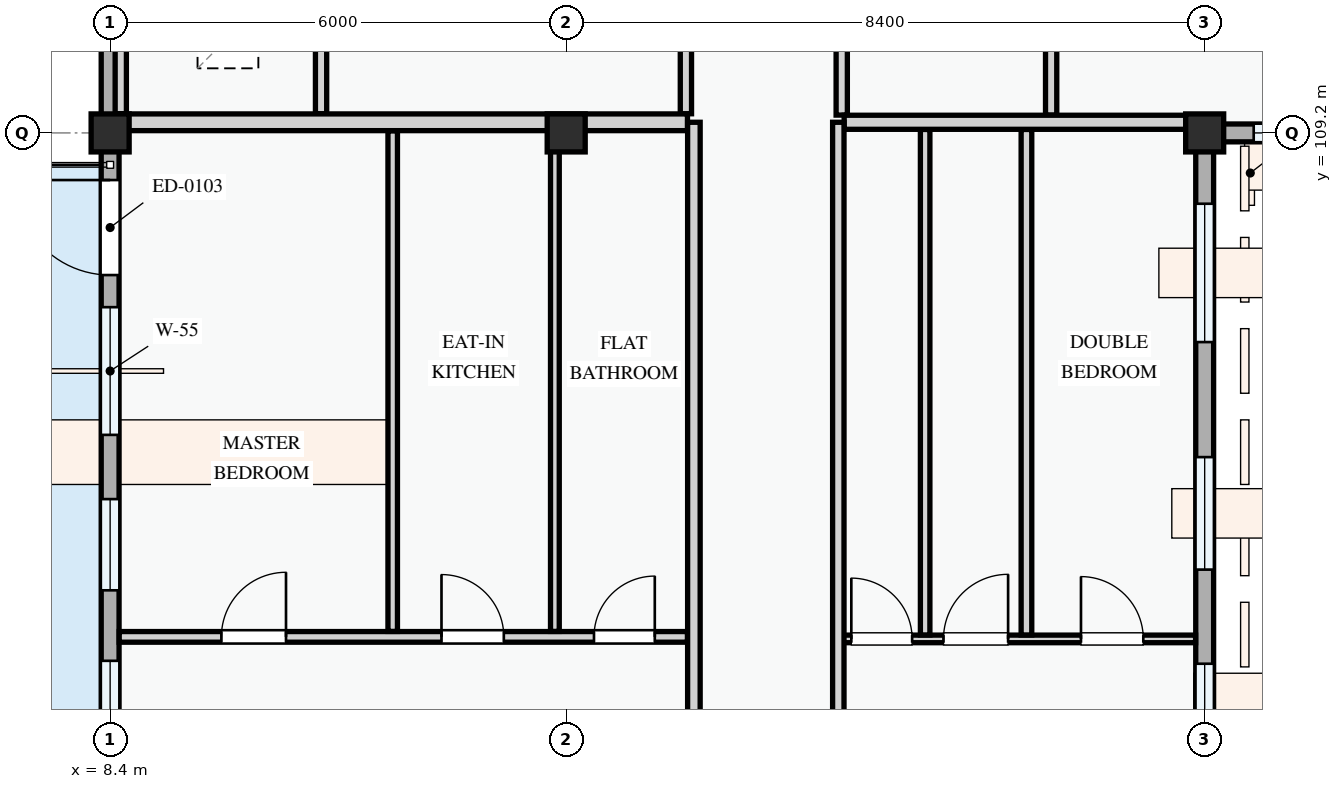
"""IFC4 building model, lengths in metres.
Left out: names, types, materials, properties, quantities, classifications, styles, units other than length and angle.
Written with IfcOpenShell. Run it as: python <this file> out.ifc"""

import sys

from ifc_helpers import new_model, si_unit, direction, frame, frame_2d, origin, origin_2d, place, context, subcontext, project, spatial, rectangle, extrude, element, fill, save


model = new_model("IFC4")
c1 = context("Model", 3, precision=1e-05, world=origin(), true_north=direction((0.0, 1.0)))
c2 = subcontext(c1, "Body", "Model", "MODEL_VIEW")
j1 = project(units=[si_unit("LENGTHUNIT", "METRE"), si_unit("PLANEANGLEUNIT", "RADIAN")], contexts=[c1])
p1 = place(None, origin())
s1 = spatial("IfcSite", under=j1, at=p1, CompositionType="ELEMENT")
p2 = place(p1, origin())
s2 = spatial("IfcBuilding", under=s1, at=p2, CompositionType="ELEMENT")
p3 = place(p2, frame((0.0, 0.0, 44.4)))
s3 = spatial("IfcBuildingStorey", under=s2, at=p3, CompositionType="ELEMENT", Elevation=44.4)
for number, where, z_axis, x_axis in (
    (1, (8.4, 109.2, 0.0), (0.0, 0.0, 1.0), (1.0, 0.0, 0.0)),
    (2, (14.4, 109.2, 0.0), (0.0, 0.0, 1.0), (1.0, 0.0, 0.0)),
    (3, (22.8, 109.2, 0.0), (0.0, 0.0, 1.0), (1.0, 0.0, 0.0)),
):
    element("IfcColumn", number, at=place(p3, frame(where, z_axis=z_axis, x_axis=x_axis)), inside=s3, PredefinedType="COLUMN", context=c2, shape_type="SweptSolid", body=[
        extrude(rectangle(XDim=0.5, YDim=0.5, at=origin_2d()), origin(), (0.0, 0.0, 1.0), 3.3),
    ])
p4 = place(p3, frame((22.8, 109.2, 0.0), z_axis=(0.0, 0.0, 1.0), x_axis=(1.0, 0.0, 0.0)))
e4 = element("IfcWall", 4, at=p4, inside=s3, PredefinedType="STANDARD", context=c2, shape_type="SweptSolid", body=[
    extrude(rectangle(XDim=6.0, YDim=0.235, at=frame_2d((3.0, 0.0))), origin(), (0.0, 0.0, 1.0), 2.525),
])
p5 = place(p4, frame((0.645, 0.0, 0.78)))
e5 = element("IfcOpeningElement", 5, at=p5, cuts=e4, PredefinedType="OPENING", context=c2, shape_type="SweptSolid", body=[
    extrude(rectangle(XDim=1.25, YDim=1.45, at=frame_2d((0.625, 0.725))), frame((0.0, 0.127, 0.0), z_axis=(0.0, -1.0, 0.0), x_axis=(1.0, 0.0, 0.0)), (0.0, 0.0, 1.0), 0.255),
])
p6 = place(p4, frame((3.17, 0.0, 0.78)))
e6 = element("IfcOpeningElement", 6, at=p6, cuts=e4, PredefinedType="OPENING", context=c2, shape_type="SweptSolid", body=[
    extrude(rectangle(XDim=1.82, YDim=1.46, at=frame_2d((0.91, 0.73))), frame((0.0, 0.127, 0.0), z_axis=(0.0, -1.0, 0.0), x_axis=(1.0, 0.0, 0.0)), (0.0, 0.0, 1.0), 0.255),
])
p7 = place(p3, frame((8.4, 115.2, 0.0), z_axis=(0.0, 0.0, 1.0), x_axis=(0.0, -1.0, 0.0)))
e7 = element("IfcWall", 7, at=p7, inside=s3, PredefinedType="STANDARD", context=c2, shape_type="SweptSolid", body=[
    extrude(rectangle(XDim=6.0, YDim=0.235, at=frame_2d((3.0, 0.0))), origin(), (0.0, 0.0, 1.0), 2.575),
])
p8 = place(p7, frame((0.545, 0.0, 0.78)))
e8 = element("IfcOpeningElement", 8, at=p8, cuts=e7, PredefinedType="OPENING", context=c2, shape_type="SweptSolid", body=[
    extrude(rectangle(XDim=0.9, YDim=1.2, at=frame_2d((0.45, 0.6))), frame((0.0, 0.127, 0.0), z_axis=(0.0, -1.0, 0.0), x_axis=(1.0, 0.0, 0.0)), (0.0, 0.0, 1.0), 0.255),
])
p9 = place(p7, frame((3.33, 0.0, 0.78)))
e9 = element("IfcOpeningElement", 9, at=p9, cuts=e7, PredefinedType="OPENING", context=c2, shape_type="SweptSolid", body=[
    extrude(rectangle(XDim=0.95, YDim=1.15, at=frame_2d((0.475, 0.575))), frame((0.0, 0.127, 0.0), z_axis=(0.0, -1.0, 0.0), x_axis=(1.0, 0.0, 0.0)), (0.0, 0.0, 1.0), 0.255),
])
p10 = place(p3, frame((8.4, 109.2, 0.0), z_axis=(0.0, 0.0, 1.0), x_axis=(0.0, -1.0, 0.0)))
e10 = element("IfcWall", 10, at=p10, inside=s3, PredefinedType="STANDARD", context=c2, shape_type="SweptSolid", body=[
    extrude(rectangle(XDim=8.4, YDim=0.235, at=frame_2d((4.2, 0.0))), origin(), (0.0, 0.0, 1.0), 2.425),
])
p11 = place(p10, frame((0.62, 0.0, 0.0)))
e11 = element("IfcOpeningElement", 11, at=p11, cuts=e10, PredefinedType="OPENING", context=c2, shape_type="SweptSolid", body=[
    extrude(rectangle(XDim=1.25, YDim=2.2, at=frame_2d((0.625, 1.1))), frame((0.0, 0.127, 0.0), z_axis=(0.0, -1.0, 0.0), x_axis=(1.0, 0.0, 0.0)), (0.0, 0.0, 1.0), 0.255),
])
p12 = place(p10, frame((2.292, 0.0, 0.78)))
e12 = element("IfcOpeningElement", 12, at=p12, cuts=e10, PredefinedType="OPENING", context=c2, shape_type="SweptSolid", body=[
    extrude(rectangle(XDim=1.68, YDim=1.46, at=frame_2d((0.84, 0.73))), frame((0.0, 0.127, 0.0), z_axis=(0.0, -1.0, 0.0), x_axis=(1.0, 0.0, 0.0)), (0.0, 0.0, 1.0), 0.255),
])
p13 = place(p10, frame((4.817, 0.0, 0.78)))
e13 = element("IfcOpeningElement", 13, at=p13, cuts=e10, PredefinedType="OPENING", context=c2, shape_type="SweptSolid", body=[
    extrude(rectangle(XDim=1.2, YDim=1.35, at=frame_2d((0.6, 0.675))), frame((0.0, 0.127, 0.0), z_axis=(0.0, -1.0, 0.0), x_axis=(1.0, 0.0, 0.0)), (0.0, 0.0, 1.0), 0.255),
])
p14 = place(p10, frame((6.945, 0.0, 0.78)))
e14 = element("IfcOpeningElement", 14, at=p14, cuts=e10, PredefinedType="OPENING", context=c2, shape_type="SweptSolid", body=[
    extrude(rectangle(XDim=0.95, YDim=1.15, at=frame_2d((0.475, 0.575))), frame((0.0, 0.127, 0.0), z_axis=(0.0, -1.0, 0.0), x_axis=(1.0, 0.0, 0.0)), (0.0, 0.0, 1.0), 0.255),
])
p15 = place(p3, frame((22.8, 100.8, 0.0), z_axis=(0.0, 0.0, 1.0), x_axis=(0.0, 1.0, 0.0)))
e15 = element("IfcWall", 15, at=p15, inside=s3, PredefinedType="STANDARD", context=c2, shape_type="SweptSolid", body=[
    extrude(rectangle(XDim=8.4, YDim=0.235, at=frame_2d((4.2, 0.0))), origin(), (0.0, 0.0, 1.0), 2.425),
])
p16 = place(p15, frame((0.517, 0.0, 0.78)))
e16 = element("IfcOpeningElement", 16, at=p16, cuts=e15, PredefinedType="OPENING", context=c2, shape_type="SweptSolid", body=[
    extrude(rectangle(XDim=0.9, YDim=1.2, at=frame_2d((0.45, 0.6))), frame((0.0, 0.127, 0.0), z_axis=(0.0, -1.0, 0.0), x_axis=(1.0, 0.0, 0.0)), (0.0, 0.0, 1.0), 0.255),
])
p17 = place(p15, frame((2.655, 0.0, 0.78)))
e17 = element("IfcOpeningElement", 17, at=p17, cuts=e15, PredefinedType="OPENING", context=c2, shape_type="SweptSolid", body=[
    extrude(rectangle(XDim=1.48, YDim=1.52, at=frame_2d((0.74, 0.76))), frame((0.0, 0.127, 0.0), z_axis=(0.0, -1.0, 0.0), x_axis=(1.0, 0.0, 0.0)), (0.0, 0.0, 1.0), 0.255),
])
p18 = place(p15, frame((5.648, 0.0, 0.78)))
e18 = element("IfcOpeningElement", 18, at=p18, cuts=e15, PredefinedType="OPENING", context=c2, shape_type="SweptSolid", body=[
    extrude(rectangle(XDim=1.82, YDim=1.46, at=frame_2d((0.91, 0.73))), frame((0.0, 0.127, 0.0), z_axis=(0.0, -1.0, 0.0), x_axis=(1.0, 0.0, 0.0)), (0.0, 0.0, 1.0), 0.255),
])
p19 = place(p3, frame((8.54, 113.324, 0.0), z_axis=(0.0, 0.0, 1.0), x_axis=(0.0, -1.0, 0.0)))
e19 = element("IfcWall", 19, at=p19, inside=s3, PredefinedType="PARTITIONING", context=c2, shape_type="SweptSolid", body=[
    extrude(rectangle(XDim=3.872, YDim=0.148, at=frame_2d((1.936, 0.0))), origin(), (0.0, 0.0, 1.0), 2.575),
])
for number, where, z_axis, x_axis in (
    (20, (11.175, 113.324, 0.0), (0.0, 0.0, 1.0), (0.0, -1.0, 0.0)),
    (21, (15.975, 113.324, 0.0), (0.0, 0.0, 1.0), (0.0, -1.0, 0.0)),
):
    element("IfcWall", number, at=place(p3, frame(where, z_axis=z_axis, x_axis=x_axis)), inside=s3, PredefinedType="PARTITIONING", context=c2, shape_type="SweptSolid", body=[
        extrude(rectangle(XDim=3.872, YDim=0.148, at=frame_2d((1.936, 0.0))), origin(), (0.0, 0.0, 1.0), 3.0),
    ])
for number, where, z_axis, x_axis in (
    (22, (18.025, 113.324, 0.0), (0.0, 0.0, 1.0), (0.0, -1.0, 0.0)),
    (23, (20.78, 113.324, 0.0), (0.0, 0.0, 1.0), (0.0, -1.0, 0.0)),
):
    element("IfcWall", number, at=place(p3, frame(where, z_axis=z_axis, x_axis=x_axis)), inside=s3, PredefinedType="PARTITIONING", context=c2, shape_type="SweptSolid", body=[
        extrude(rectangle(XDim=3.889, YDim=0.148, at=frame_2d((1.945, 0.0))), origin(), (0.0, 0.0, 1.0), 3.0),
    ])
p20 = place(p3, frame((8.52, 102.57, 0.0), z_axis=(0.0, 0.0, 1.0), x_axis=(1.0, 0.0, 0.0)))
e24 = element("IfcWall", 24, at=p20, inside=s3, PredefinedType="PARTITIONING", context=c2, shape_type="SweptSolid", body=[
    extrude(rectangle(XDim=7.476, YDim=0.14, at=frame_2d((3.738, 0.0))), origin(), (0.0, 0.0, 1.0), 3.0),
])
p21 = place(p20, frame((1.344, 0.0, 0.0)))
e25 = element("IfcOpeningElement", 25, at=p21, cuts=e24, PredefinedType="OPENING", context=c2, shape_type="SweptSolid", body=[
    extrude(rectangle(XDim=0.85, YDim=2.1, at=frame_2d((0.425, 1.05))), frame((0.0, 0.08, 0.0), z_axis=(0.0, -1.0, 0.0), x_axis=(1.0, 0.0, 0.0)), (0.0, 0.0, 1.0), 0.16),
])
p22 = place(p20, frame((4.24, 0.0, 0.0)))
e26 = element("IfcOpeningElement", 26, at=p22, cuts=e24, PredefinedType="OPENING", context=c2, shape_type="SweptSolid", body=[
    extrude(rectangle(XDim=0.82, YDim=2.08, at=frame_2d((0.41, 1.04))), frame((0.0, 0.08, 0.0), z_axis=(0.0, -1.0, 0.0), x_axis=(1.0, 0.0, 0.0)), (0.0, 0.0, 1.0), 0.16),
])
p23 = place(p20, frame((6.246, 0.0, 0.0)))
e27 = element("IfcOpeningElement", 27, at=p23, cuts=e24, PredefinedType="OPENING", context=c2, shape_type="SweptSolid", body=[
    extrude(rectangle(XDim=0.8, YDim=2.1, at=frame_2d((0.4, 1.05))), frame((0.0, 0.08, 0.0), z_axis=(0.0, -1.0, 0.0), x_axis=(1.0, 0.0, 0.0)), (0.0, 0.0, 1.0), 0.16),
])
p24 = place(p3, frame((12.118, 102.642, 0.0), z_axis=(0.0, 0.0, 1.0), x_axis=(0.0, 1.0, 0.0)))
e28 = element("IfcWall", 28, at=p24, inside=s3, PredefinedType="PARTITIONING", context=c2, shape_type="SweptSolid", body=[
    extrude(rectangle(XDim=6.586, YDim=0.125, at=frame_2d((3.293, 0.0))), origin(), (0.0, 0.0, 1.0), 3.0),
])
p25 = place(p3, frame((14.251, 102.642, 0.0), z_axis=(0.0, 0.0, 1.0), x_axis=(0.0, 1.0, 0.0)))
e29 = element("IfcWall", 29, at=p25, inside=s3, PredefinedType="PARTITIONING", context=c2, shape_type="SweptSolid", body=[
    extrude(rectangle(XDim=6.586, YDim=0.115, at=frame_2d((3.293, 0.0))), origin(), (0.0, 0.0, 1.0), 2.425),
])
p26 = place(p3, frame((17.98, 102.543, 0.0), z_axis=(0.0, 0.0, 1.0), x_axis=(1.0, 0.0, 0.0)))
e30 = element("IfcWall", 30, at=p26, inside=s3, PredefinedType="PARTITIONING", context=c2, shape_type="SweptSolid", body=[
    extrude(rectangle(XDim=4.7, YDim=0.1, at=frame_2d((2.35, 0.0))), origin(), (0.0, 0.0, 1.0), 3.0),
])
p27 = place(p26, frame((0.171, 0.0, 0.0)))
e31 = element("IfcOpeningElement", 31, at=p27, cuts=e30, PredefinedType="OPENING", context=c2, shape_type="SweptSolid", body=[
    extrude(rectangle(XDim=0.8, YDim=2.1, at=frame_2d((0.4, 1.05))), frame((0.0, 0.06, 0.0), z_axis=(0.0, -1.0, 0.0), x_axis=(1.0, 0.0, 0.0)), (0.0, 0.0, 1.0), 0.12),
])
p28 = place(p26, frame((1.384, 0.0, 0.0)))
e32 = element("IfcOpeningElement", 32, at=p28, cuts=e30, PredefinedType="OPENING", context=c2, shape_type="SweptSolid", body=[
    extrude(rectangle(XDim=0.85, YDim=2.1, at=frame_2d((0.425, 1.05))), frame((0.0, 0.06, 0.0), z_axis=(0.0, -1.0, 0.0), x_axis=(1.0, 0.0, 0.0)), (0.0, 0.0, 1.0), 0.12),
])
p29 = place(p26, frame((3.193, 0.0, 0.0)))
e33 = element("IfcOpeningElement", 33, at=p29, cuts=e30, PredefinedType="OPENING", context=c2, shape_type="SweptSolid", body=[
    extrude(rectangle(XDim=0.82, YDim=2.08, at=frame_2d((0.41, 1.04))), frame((0.0, 0.06, 0.0), z_axis=(0.0, -1.0, 0.0), x_axis=(1.0, 0.0, 0.0)), (0.0, 0.0, 1.0), 0.12),
])
p30 = place(p3, frame((20.455, 102.595, 0.0), z_axis=(0.0, 0.0, 1.0), x_axis=(0.0, 1.0, 0.0)))
e34 = element("IfcWall", 34, at=p30, inside=s3, PredefinedType="PARTITIONING", context=c2, shape_type="SweptSolid", body=[
    extrude(rectangle(XDim=6.65, YDim=0.14, at=frame_2d((3.325, 0.0))), origin(), (0.0, 0.0, 1.0), 3.0),
])
p31 = place(p3, frame((19.122, 102.595, 0.0), z_axis=(0.0, 0.0, 1.0), x_axis=(0.0, 1.0, 0.0)))
e35 = element("IfcWall", 35, at=p31, inside=s3, PredefinedType="PARTITIONING", context=c2, shape_type="SweptSolid", body=[
    extrude(rectangle(XDim=6.65, YDim=0.125, at=frame_2d((3.325, 0.0))), origin(), (0.0, 0.0, 1.0), 3.0),
])
p32 = place(p3, frame((8.52, 109.34, 0.0), z_axis=(0.0, 0.0, 1.0), x_axis=(1.0, 0.0, 0.0)))
e36 = element("IfcWall", 36, at=p32, inside=s3, PredefinedType="PARTITIONING", context=c2, shape_type="SweptSolid", body=[
    extrude(rectangle(XDim=7.476, YDim=0.22, at=frame_2d((3.738, 0.0))), origin(), (0.0, 0.0, 1.0), 2.375),
])
p33 = place(p3, frame((18.057, 109.34, 0.0), z_axis=(0.0, 0.0, 1.0), x_axis=(1.0, 0.0, 0.0)))
e37 = element("IfcWall", 37, at=p33, inside=s3, PredefinedType="PARTITIONING", context=c2, shape_type="SweptSolid", body=[
    extrude(rectangle(XDim=4.683, YDim=0.185, at=frame_2d((2.342, 0.0))), origin(), (0.0, 0.0, 1.0), 2.375),
])
p34 = place(p3, frame((16.08, 86.46, 0.0), z_axis=(0.0, 0.0, 1.0), x_axis=(0.0, 1.0, 0.0)))
e38 = element("IfcWall", 38, at=p34, inside=s3, PredefinedType="PARTITIONING", context=c2, shape_type="SweptSolid", body=[
    extrude(rectangle(XDim=22.88, YDim=0.165, at=frame_2d((11.44, 0.0))), origin(), (0.0, 0.0, 1.0), 3.0),
])
p35 = place(p34, frame((2.06, 0.0, 0.0)))
e39 = element("IfcOpeningElement", 39, at=p35, cuts=e38, PredefinedType="OPENING", context=c2, shape_type="SweptSolid", body=[
    extrude(rectangle(XDim=0.96, YDim=2.12, at=frame_2d((0.48, 1.06))), frame((0.0, 0.093, 0.0), z_axis=(0.0, -1.0, 0.0), x_axis=(1.0, 0.0, 0.0)), (0.0, 0.0, 1.0), 0.185),
])
p36 = place(p34, frame((10.845, 0.0, 0.0)))
e40 = element("IfcOpeningElement", 40, at=p36, cuts=e38, PredefinedType="OPENING", context=c2, shape_type="SweptSolid", body=[
    extrude(rectangle(XDim=0.92, YDim=2.1, at=frame_2d((0.46, 1.05))), frame((0.0, 0.093, 0.0), z_axis=(0.0, -1.0, 0.0), x_axis=(1.0, 0.0, 0.0)), (0.0, 0.0, 1.0), 0.185),
])
p37 = place(p3, frame((17.98, 86.46, 0.0), z_axis=(0.0, 0.0, 1.0), x_axis=(0.0, 1.0, 0.0)))
e41 = element("IfcWall", 41, at=p37, inside=s3, PredefinedType="PARTITIONING", context=c2, shape_type="SweptSolid", body=[
    extrude(rectangle(XDim=22.88, YDim=0.15, at=frame_2d((11.44, 0.0))), origin(), (0.0, 0.0, 1.0), 3.0),
])
p38 = place(p37, frame((1.929, 0.0, 0.0)))
e42 = element("IfcOpeningElement", 42, at=p38, cuts=e41, PredefinedType="OPENING", context=c2, shape_type="SweptSolid", body=[
    extrude(rectangle(XDim=0.92, YDim=2.1, at=frame_2d((0.46, 1.05))), frame((0.0, 0.085, 0.0), z_axis=(0.0, -1.0, 0.0), x_axis=(1.0, 0.0, 0.0)), (0.0, 0.0, 1.0), 0.17),
])
p39 = place(p37, frame((10.832, 0.0, 0.0)))
e43 = element("IfcOpeningElement", 43, at=p39, cuts=e41, PredefinedType="OPENING", context=c2, shape_type="SweptSolid", body=[
    extrude(rectangle(XDim=0.92, YDim=2.1, at=frame_2d((0.46, 1.05))), frame((0.0, 0.085, 0.0), z_axis=(0.0, -1.0, 0.0), x_axis=(1.0, 0.0, 0.0)), (0.0, 0.0, 1.0), 0.17),
])
p40 = place(p5, origin())
e44 = element("IfcWindow", 44, at=p40, inside=s3, PartitioningType="SINGLE_PANEL", PredefinedType="WINDOW", context=c2, shape_type="SweptSolid", body=[
    extrude(rectangle(XDim=1.25, YDim=1.45, at=frame_2d((0.625, 0.725))), frame((0.0, 0.03, 0.0), z_axis=(0.0, -1.0, 0.0), x_axis=(1.0, 0.0, 0.0)), (0.0, 0.0, 1.0), 0.06),
])
fill(e5, e44)
p41 = place(p11, frame((1.25, 0.0, 0.0), z_axis=(0.0, 0.0, 1.0), x_axis=(-1.0, 0.0, 0.0)))
e45 = element("IfcDoor", 45, at=p41, inside=s3, OperationType="SINGLE_SWING_RIGHT", PredefinedType="DOOR", context=c2, shape_type="SweptSolid", body=[
    extrude(rectangle(XDim=1.25, YDim=2.2, at=frame_2d((0.625, 1.1))), frame((0.0, 0.025, 0.0), z_axis=(0.0, -1.0, 0.0), x_axis=(1.0, 0.0, 0.0)), (0.0, 0.0, 1.0), 0.05),
])
fill(e11, e45)
p42 = place(p12, origin())
e46 = element("IfcWindow", 46, at=p42, inside=s3, PartitioningType="DOUBLE_PANEL_VERTICAL", PredefinedType="WINDOW", context=c2, shape_type="SweptSolid", body=[
    extrude(rectangle(XDim=1.68, YDim=1.46, at=frame_2d((0.84, 0.73))), frame((0.0, 0.03, 0.0), z_axis=(0.0, -1.0, 0.0), x_axis=(1.0, 0.0, 0.0)), (0.0, 0.0, 1.0), 0.06),
])
fill(e12, e46)
p43 = place(p13, origin())
e47 = element("IfcWindow", 47, at=p43, inside=s3, PartitioningType="SINGLE_PANEL", PredefinedType="WINDOW", context=c2, shape_type="SweptSolid", body=[
    extrude(rectangle(XDim=1.2, YDim=1.35, at=frame_2d((0.6, 0.675))), frame((0.0, 0.03, 0.0), z_axis=(0.0, -1.0, 0.0), x_axis=(1.0, 0.0, 0.0)), (0.0, 0.0, 1.0), 0.06),
])
fill(e13, e47)
p44 = place(p14, origin())
e48 = element("IfcWindow", 48, at=p44, inside=s3, PartitioningType="SINGLE_PANEL", PredefinedType="WINDOW", context=c2, shape_type="SweptSolid", body=[
    extrude(rectangle(XDim=0.95, YDim=1.15, at=frame_2d((0.475, 0.575))), frame((0.0, 0.03, 0.0), z_axis=(0.0, -1.0, 0.0), x_axis=(1.0, 0.0, 0.0)), (0.0, 0.0, 1.0), 0.06),
])
fill(e14, e48)
p45 = place(p16, origin())
e49 = element("IfcWindow", 49, at=p45, inside=s3, PartitioningType="SINGLE_PANEL", PredefinedType="WINDOW", context=c2, shape_type="SweptSolid", body=[
    extrude(rectangle(XDim=0.9, YDim=1.2, at=frame_2d((0.45, 0.6))), frame((0.0, 0.03, 0.0), z_axis=(0.0, -1.0, 0.0), x_axis=(1.0, 0.0, 0.0)), (0.0, 0.0, 1.0), 0.06),
])
fill(e16, e49)
p46 = place(p17, origin())
e50 = element("IfcWindow", 50, at=p46, inside=s3, PartitioningType="SINGLE_PANEL", PredefinedType="WINDOW", context=c2, shape_type="SweptSolid", body=[
    extrude(rectangle(XDim=1.48, YDim=1.52, at=frame_2d((0.74, 0.76))), frame((0.0, 0.03, 0.0), z_axis=(0.0, -1.0, 0.0), x_axis=(1.0, 0.0, 0.0)), (0.0, 0.0, 1.0), 0.06),
])
fill(e17, e50)
p47 = place(p18, origin())
e51 = element("IfcWindow", 51, at=p47, inside=s3, PartitioningType="DOUBLE_PANEL_VERTICAL", PredefinedType="WINDOW", context=c2, shape_type="SweptSolid", body=[
    extrude(rectangle(XDim=1.82, YDim=1.46, at=frame_2d((0.91, 0.73))), frame((0.0, 0.03, 0.0), z_axis=(0.0, -1.0, 0.0), x_axis=(1.0, 0.0, 0.0)), (0.0, 0.0, 1.0), 0.06),
])
fill(e18, e51)
p48 = place(p21, origin())
e52 = element("IfcDoor", 52, at=p48, inside=s3, OperationType="SINGLE_SWING_RIGHT", PredefinedType="DOOR", context=c2, shape_type="SweptSolid", body=[
    extrude(rectangle(XDim=0.85, YDim=2.1, at=frame_2d((0.425, 1.05))), frame((0.0, 0.025, 0.0), z_axis=(0.0, -1.0, 0.0), x_axis=(1.0, 0.0, 0.0)), (0.0, 0.0, 1.0), 0.05),
])
fill(e25, e52)
p49 = place(p22, origin())
e53 = element("IfcDoor", 53, at=p49, inside=s3, OperationType="SINGLE_SWING_LEFT", PredefinedType="DOOR", context=c2, shape_type="SweptSolid", body=[
    extrude(rectangle(XDim=0.82, YDim=2.08, at=frame_2d((0.41, 1.04))), frame((0.0, 0.025, 0.0), z_axis=(0.0, -1.0, 0.0), x_axis=(1.0, 0.0, 0.0)), (0.0, 0.0, 1.0), 0.05),
])
fill(e26, e53)
p50 = place(p23, origin())
e54 = element("IfcDoor", 54, at=p50, inside=s3, OperationType="SINGLE_SWING_RIGHT", PredefinedType="DOOR", context=c2, shape_type="SweptSolid", body=[
    extrude(rectangle(XDim=0.8, YDim=2.1, at=frame_2d((0.4, 1.05))), frame((0.0, 0.025, 0.0), z_axis=(0.0, -1.0, 0.0), x_axis=(1.0, 0.0, 0.0)), (0.0, 0.0, 1.0), 0.05),
])
fill(e27, e54)
p51 = place(p27, origin())
e55 = element("IfcDoor", 55, at=p51, inside=s3, OperationType="SINGLE_SWING_LEFT", PredefinedType="DOOR", context=c2, shape_type="SweptSolid", body=[
    extrude(rectangle(XDim=0.8, YDim=2.1, at=frame_2d((0.4, 1.05))), frame((0.0, 0.025, 0.0), z_axis=(0.0, -1.0, 0.0), x_axis=(1.0, 0.0, 0.0)), (0.0, 0.0, 1.0), 0.05),
])
fill(e31, e55)
p52 = place(p28, origin())
e56 = element("IfcDoor", 56, at=p52, inside=s3, OperationType="SINGLE_SWING_RIGHT", PredefinedType="DOOR", context=c2, shape_type="SweptSolid", body=[
    extrude(rectangle(XDim=0.85, YDim=2.1, at=frame_2d((0.425, 1.05))), frame((0.0, 0.025, 0.0), z_axis=(0.0, -1.0, 0.0), x_axis=(1.0, 0.0, 0.0)), (0.0, 0.0, 1.0), 0.05),
])
fill(e32, e56)
p53 = place(p29, origin())
e57 = element("IfcDoor", 57, at=p53, inside=s3, OperationType="SINGLE_SWING_LEFT", PredefinedType="DOOR", context=c2, shape_type="SweptSolid", body=[
    extrude(rectangle(XDim=0.82, YDim=2.08, at=frame_2d((0.41, 1.04))), frame((0.0, 0.025, 0.0), z_axis=(0.0, -1.0, 0.0), x_axis=(1.0, 0.0, 0.0)), (0.0, 0.0, 1.0), 0.05),
])
fill(e33, e57)
save(model, sys.argv[1])
